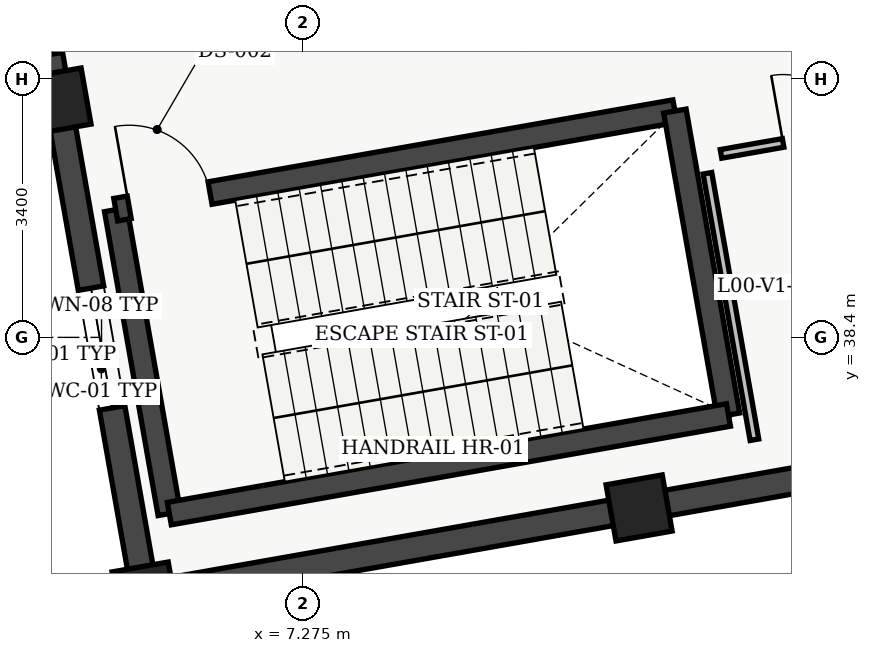
"""IFC4 building model, lengths in metres.
Left out: names, types, materials, properties, quantities, classifications, styles, units other than length and angle.
Written with IfcOpenShell. Run it as: python <this file> out.ifc"""

import sys

from ifc_helpers import new_model, si_unit, direction, frame, frame_2d, origin, origin_2d, place, context, subcontext, project, spatial, rectangle, extrude, element, fill, save


model = new_model("IFC4")
c1 = context("Model", 3, precision=1e-05, world=origin(), true_north=direction((0.0, 1.0)))
c2 = subcontext(c1, "Body", "Model", "MODEL_VIEW")
j1 = project(units=[si_unit("LENGTHUNIT", "METRE"), si_unit("PLANEANGLEUNIT", "RADIAN")], contexts=[c1])
p1 = place(None, origin())
s1 = spatial("IfcSite", under=j1, at=p1, CompositionType="ELEMENT")
p2 = place(p1, origin())
s2 = spatial("IfcBuilding", under=s1, at=p2, CompositionType="ELEMENT")
p3 = place(p2, origin())
s3 = spatial("IfcBuildingStorey", under=s2, at=p3, CompositionType="ELEMENT", Elevation=0.0)
for number, where, z_axis, x_axis in (
    (1, (5.2, 35.01, 0.0), (0.0, 0.0, 1.0), (0.985, 0.174, 0.0)),
    (2, (4.054, 41.51, 0.0), (0.0, 0.0, 1.0), (0.985, 0.174, 0.0)),
    (3, (11.7, 36.156, 0.0), (0.0, 0.0, 1.0), (0.985, 0.174, 0.0)),
):
    element("IfcColumn", number, at=place(p3, frame(where, z_axis=z_axis, x_axis=x_axis)), inside=s3, PredefinedType="COLUMN", context=c2, shape_type="SweptSolid", body=[
        extrude(rectangle(XDim=0.75, YDim=0.75, at=origin_2d()), origin(), (0.0, 0.0, 1.0), 4.92),
    ])
p4 = place(p3, frame((5.136, 35.374, 0.0), z_axis=(0.0, 0.0, 1.0), x_axis=(-0.1736474839, 0.984807875342, 0.0)))
e4 = element("IfcWall", 4, at=p4, inside=s3, PredefinedType="SOLIDWALL", context=c2, shape_type="SweptSolid", body=[
    extrude(rectangle(XDim=5.86, YDim=0.34, at=frame_2d((2.93, 0.0))), origin(), (0.0, 0.0, 1.0), 4.455),
])
p5 = place(p4, frame((2.13, 0.0, 0.95)))
e5 = element("IfcOpeningElement", 5, at=p5, cuts=e4, PredefinedType="OPENING", context=c2, shape_type="SweptSolid", body=[
    extrude(rectangle(XDim=1.6, YDim=1.4, at=frame_2d((0.8, 0.7))), frame((0.0, 0.17, 0.0), z_axis=(0.0, -1.0, 0.0), x_axis=(1.0, 0.0, 0.0)), (0.0, 0.0, 1.0), 0.34),
])
p6 = place(p3, frame((3.99, 41.874, 0.0), z_axis=(0.0, 0.0, 1.0), x_axis=(-0.1736474839, 0.984807875342, 0.0)))
e6 = element("IfcWall", 6, at=p6, inside=s3, PredefinedType="SOLIDWALL", context=c2, shape_type="SweptSolid", body=[
    extrude(rectangle(XDim=5.86, YDim=0.34, at=frame_2d((2.93, 0.0))), origin(), (0.0, 0.0, 1.0), 4.455),
])
p7 = place(p6, frame((0.25, 0.0, 0.0)))
e7 = element("IfcOpeningElement", 7, at=p7, cuts=e6, PredefinedType="OPENING", context=c2, shape_type="SweptSolid", body=[
    extrude(rectangle(XDim=2.0, YDim=2.25, at=frame_2d((1.0, 1.125))), frame((0.0, 0.17, 0.0), z_axis=(0.0, -1.0, 0.0), x_axis=(1.0, 0.0, 0.0)), (0.0, 0.0, 1.0), 0.34),
])
p8 = place(p3, frame((17.835, 37.238, 0.0), z_axis=(0.0, 0.0, 1.0), x_axis=(-0.98480661901, -0.173654608793, 0.0)))
e8 = element("IfcWall", 8, at=p8, inside=s3, PredefinedType="SOLIDWALL", context=c2, shape_type="SweptSolid", body=[
    extrude(rectangle(XDim=5.86, YDim=0.34, at=frame_2d((2.93, 0.0))), origin(), (0.0, 0.0, 1.0), 4.455),
])
p9 = place(p8, frame((1.93, 0.0, 0.0)))
e9 = element("IfcOpeningElement", 9, at=p9, cuts=e8, PredefinedType="OPENING", context=c2, shape_type="SweptSolid", body=[
    extrude(rectangle(XDim=2.0, YDim=2.25, at=frame_2d((1.0, 1.125))), frame((0.0, 0.17, 0.0), z_axis=(0.0, -1.0, 0.0), x_axis=(1.0, 0.0, 0.0)), (0.0, 0.0, 1.0), 0.34),
])
p10 = place(p3, frame((11.335, 36.092, 0.0), z_axis=(0.0, 0.0, 1.0), x_axis=(-0.984807875342, -0.1736474839, 0.0)))
e10 = element("IfcWall", 10, at=p10, inside=s3, PredefinedType="SOLIDWALL", context=c2, shape_type="SweptSolid", body=[
    extrude(rectangle(XDim=5.86, YDim=0.34, at=frame_2d((2.93, 0.0))), origin(), (0.0, 0.0, 1.0), 4.455),
])
p11 = place(p3, frame((5.519, 36.082, 0.0), z_axis=(0.0, 0.0, 1.0), x_axis=(-0.173665267602, 0.984804739443, 0.0)))
e11 = element("IfcWall", 11, at=p11, inside=s3, PredefinedType="SHEAR", context=c2, shape_type="SweptSolid", body=[
    extrude(rectangle(XDim=4.06, YDim=0.3, at=frame_2d((2.03, 0.0))), origin(), (0.0, 0.0, 1.0), 4.88),
])
p12 = place(p3, frame((4.814, 40.08, 0.0), z_axis=(0.0, 0.0, 1.0), x_axis=(0.984802636214, 0.173677193974, 0.0)))
e12 = element("IfcWall", 12, at=p12, inside=s3, PredefinedType="SHEAR", context=c2, shape_type="SweptSolid", body=[
    extrude(rectangle(XDim=7.47, YDim=0.3, at=frame_2d((3.735, 0.0))), origin(), (0.0, 0.0, 1.0), 4.88),
])
p13 = place(p12, frame((0.18, 0.0, 0.0)))
e13 = element("IfcOpeningElement", 13, at=p13, cuts=e12, PredefinedType="OPENING", context=c2, shape_type="SweptSolid", body=[
    extrude(rectangle(XDim=1.08, YDim=2.15, at=frame_2d((0.54, 1.075))), frame((0.0, 0.15, 0.0), z_axis=(0.0, -1.0, 0.0), x_axis=(1.0, 0.0, 0.0)), (0.0, 0.0, 1.0), 0.3),
])
p14 = place(p3, frame((12.17, 41.377, 0.0), z_axis=(0.0, 0.0, 1.0), x_axis=(0.173654983803, -0.984806552883, 0.0)))
e14 = element("IfcWall", 14, at=p14, inside=s3, PredefinedType="SHEAR", context=c2, shape_type="SweptSolid", body=[
    extrude(rectangle(XDim=4.06, YDim=0.3, at=frame_2d((2.03, 0.0))), origin(), (0.0, 0.0, 1.0), 4.88),
])
p15 = place(p3, frame((12.875, 37.379, 0.0), z_axis=(0.0, 0.0, 1.0), x_axis=(-0.984808225754, -0.173645496596, 0.0)))
e15 = element("IfcWall", 15, at=p15, inside=s3, PredefinedType="SHEAR", context=c2, shape_type="SweptSolid", body=[
    extrude(rectangle(XDim=7.47, YDim=0.3, at=frame_2d((3.735, 0.0))), origin(), (0.0, 0.0, 1.0), 4.88),
])
p16 = place(p3, frame((15.298, 41.259, 0.0), z_axis=(0.0, 0.0, 1.0), x_axis=(-0.984803714572, -0.17367107924, 0.0)))
e16 = element("IfcWall", 16, at=p16, inside=s3, PredefinedType="PARTITIONING", context=c2, shape_type="SweptSolid", body=[
    extrude(rectangle(XDim=2.56, YDim=0.115, at=frame_2d((1.28, 0.0))), origin(), (0.0, 0.0, 1.0), 4.55),
])
p17 = place(p16, frame((0.83, 0.0, 0.0)))
e17 = element("IfcOpeningElement", 17, at=p17, cuts=e16, PredefinedType="OPENING", context=c2, shape_type="SweptSolid", body=[
    extrude(rectangle(XDim=0.9, YDim=2.1, at=frame_2d((0.45, 1.05))), frame((0.0, 0.058, 0.0), z_axis=(0.0, -1.0, 0.0), x_axis=(1.0, 0.0, 0.0)), (0.0, 0.0, 1.0), 0.115),
])
p18 = place(p3, frame((12.599, 40.559, 0.0), z_axis=(0.0, 0.0, 1.0), x_axis=(0.173644490041, -0.984808403233, 0.0)))
e18 = element("IfcWall", 18, at=p18, inside=s3, PredefinedType="PARTITIONING", context=c2, shape_type="SweptSolid", body=[
    extrude(rectangle(XDim=3.56, YDim=0.115, at=frame_2d((1.78, 0.0))), origin(), (0.0, 0.0, 1.0), 4.55),
])
p19 = place(p5, origin())
e19 = element("IfcWindow", 19, at=p19, inside=s3, PartitioningType="SINGLE_PANEL", PredefinedType="WINDOW", context=c2, shape_type="SweptSolid", body=[
    extrude(rectangle(XDim=1.6, YDim=1.4, at=frame_2d((0.8, 0.7))), frame((0.0, 0.03, 0.0), z_axis=(0.0, -1.0, 0.0), x_axis=(1.0, 0.0, 0.0)), (0.0, 0.0, 1.0), 0.06),
])
fill(e5, e19)
p20 = place(p13, origin())
e20 = element("IfcDoor", 20, at=p20, inside=s3, OperationType="SINGLE_SWING_LEFT", PredefinedType="DOOR", context=c2, shape_type="SweptSolid", body=[
    extrude(rectangle(XDim=1.08, YDim=2.15, at=frame_2d((0.54, 1.075))), frame((0.0, 0.025, 0.0), z_axis=(0.0, -1.0, 0.0), x_axis=(1.0, 0.0, 0.0)), (0.0, 0.0, 1.0), 0.05),
])
fill(e13, e20)
p21 = place(p17, origin())
e21 = element("IfcDoor", 21, at=p21, inside=s3, OperationType="SINGLE_SWING_RIGHT", PredefinedType="DOOR", context=c2, shape_type="SweptSolid", body=[
    extrude(rectangle(XDim=0.9, YDim=2.1, at=frame_2d((0.45, 1.05))), frame((0.0, 0.025, 0.0), z_axis=(0.0, -1.0, 0.0), x_axis=(1.0, 0.0, 0.0)), (0.0, 0.0, 1.0), 0.05),
])
fill(e17, e21)
save(model, sys.argv[1])
